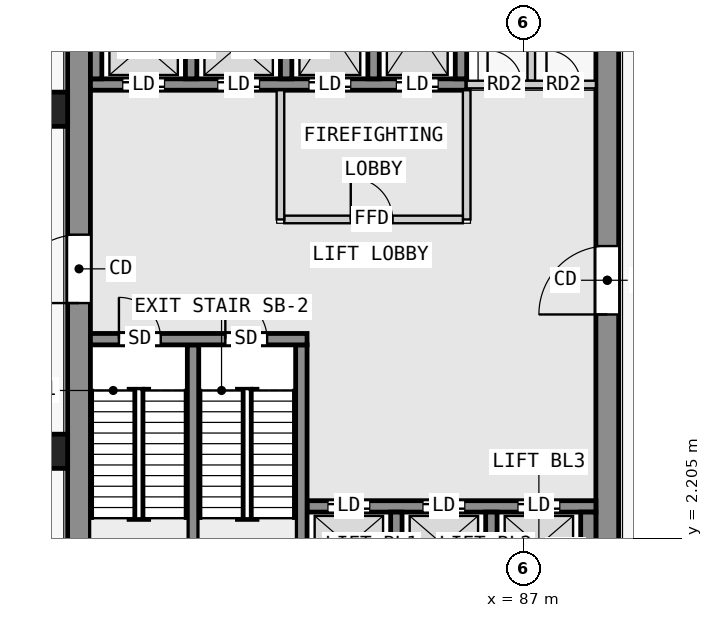
"""IFC4 building model, lengths in metres.
Left out: names, types, materials, properties, quantities, classifications, styles, units other than length and angle.
Written with IfcOpenShell. Run it as: python <this file> out.ifc"""

import sys

from ifc_helpers import new_model, si_unit, direction, frame, frame_2d, origin, origin_2d, place, context, subcontext, project, spatial, rectangle, extrude, element, fill, save


model = new_model("IFC4")
c1 = context("Model", 3, precision=1e-05, world=origin(), true_north=direction((0.0, 1.0)))
c2 = subcontext(c1, "Body", "Model", "MODEL_VIEW")
j1 = project(units=[si_unit("LENGTHUNIT", "METRE"), si_unit("PLANEANGLEUNIT", "RADIAN")], contexts=[c1])
p1 = place(None, origin())
s1 = spatial("IfcSite", under=j1, at=p1, CompositionType="ELEMENT")
p2 = place(p1, origin())
s2 = spatial("IfcBuilding", under=s1, at=p2, CompositionType="ELEMENT")
p3 = place(p2, frame((0.0, 0.0, 12.8)))
s3 = spatial("IfcBuildingStorey", under=s2, at=p3, CompositionType="ELEMENT", Elevation=12.8)
for number, where, z_axis, x_axis in (
    (1, (74.55, 13.5, 0.0), (0.0, 0.0, 1.0), (1.0, 0.0, 0.0)),
    (2, (74.55, 4.5, 0.0), (0.0, 0.0, 1.0), (1.0, 0.0, 0.0)),
):
    element("IfcColumn", number, at=place(p3, frame(where, z_axis=z_axis, x_axis=x_axis)), inside=s3, PredefinedType="COLUMN", context=c2, shape_type="SweptSolid", body=[
        extrude(rectangle(XDim=0.9, YDim=0.9, at=origin_2d()), origin(), (0.0, 0.0, 1.0), 4.5),
    ])
p4 = place(p3, frame((75.3, 0.6, 0.0), z_axis=(0.0, 0.0, 1.0), x_axis=(0.0, 1.0, 0.0)))
e3 = element("IfcWall", 3, at=p4, inside=s3, PredefinedType="SHEAR", context=c2, shape_type="SweptSolid", body=[
    extrude(rectangle(XDim=16.8, YDim=0.6, at=frame_2d((8.4, 0.0))), origin(), (0.0, 0.0, 1.0), 4.15),
])
p5 = place(p4, frame((7.8, 0.0, 0.0)))
e4 = element("IfcOpeningElement", 4, at=p5, cuts=e3, PredefinedType="OPENING", context=c2, shape_type="SweptSolid", body=[
    extrude(rectangle(XDim=1.8, YDim=2.1, at=frame_2d((0.9, 1.05))), frame((0.0, 0.31, 0.0), z_axis=(0.0, -1.0, 0.0), x_axis=(1.0, 0.0, 0.0)), (0.0, 0.0, 1.0), 0.62),
])
p6 = place(p3, frame((89.2, 0.6, 0.0), z_axis=(0.0, 0.0, 1.0), x_axis=(0.0, 1.0, 0.0)))
e5 = element("IfcWall", 5, at=p6, inside=s3, PredefinedType="SHEAR", context=c2, shape_type="SweptSolid", body=[
    extrude(rectangle(XDim=16.8, YDim=0.6, at=frame_2d((8.4, 0.0))), origin(), (0.0, 0.0, 1.0), 4.15),
])
p7 = place(p6, frame((7.5, 0.0, 0.0)))
e6 = element("IfcOpeningElement", 6, at=p7, cuts=e5, PredefinedType="OPENING", context=c2, shape_type="SweptSolid", body=[
    extrude(rectangle(XDim=1.8, YDim=2.1, at=frame_2d((0.9, 1.05))), frame((0.0, 0.31, 0.0), z_axis=(0.0, -1.0, 0.0), x_axis=(1.0, 0.0, 0.0)), (0.0, 0.0, 1.0), 0.62),
])
p8 = place(p3, frame((75.6, 7.45, 0.0), z_axis=(0.0, 0.0, 1.0), x_axis=(1.0, 0.0, 0.0)))
e7 = element("IfcWall", 7, at=p8, inside=s3, PredefinedType="SHEAR", context=c2, shape_type="SweptSolid", body=[
    extrude(rectangle(XDim=5.7, YDim=0.3, at=frame_2d((2.85, 0.0))), origin(), (0.0, 0.0, 1.0), 4.15),
])
p9 = place(p8, frame((0.75, 0.0, 0.0)))
e8 = element("IfcOpeningElement", 8, at=p9, cuts=e7, PredefinedType="OPENING", context=c2, shape_type="SweptSolid", body=[
    extrude(rectangle(XDim=1.1, YDim=2.1, at=frame_2d((0.55, 1.05))), frame((0.0, 0.16, 0.0), z_axis=(0.0, -1.0, 0.0), x_axis=(1.0, 0.0, 0.0)), (0.0, 0.0, 1.0), 0.32),
])
p10 = place(p8, frame((3.55, 0.0, 0.0)))
e9 = element("IfcOpeningElement", 9, at=p10, cuts=e7, PredefinedType="OPENING", context=c2, shape_type="SweptSolid", body=[
    extrude(rectangle(XDim=1.1, YDim=2.1, at=frame_2d((0.55, 1.05))), frame((0.0, 0.16, 0.0), z_axis=(0.0, -1.0, 0.0), x_axis=(1.0, 0.0, 0.0)), (0.0, 0.0, 1.0), 0.32),
])
for number, where, z_axis, x_axis in (
    (10, (78.3, 0.9, 0.0), (0.0, 0.0, 1.0), (0.0, 1.0, 0.0)),
    (11, (81.15, 0.9, 0.0), (0.0, 0.0, 1.0), (0.0, 1.0, 0.0)),
):
    element("IfcWall", number, at=place(p3, frame(where, z_axis=z_axis, x_axis=x_axis)), inside=s3, PredefinedType="SHEAR", context=c2, shape_type="SweptSolid", body=[
        extrude(rectangle(XDim=6.4, YDim=0.3, at=frame_2d((3.2, 0.0))), origin(), (0.0, 0.0, 1.0), 4.15),
    ])
for number, where, z_axis, x_axis in (
    (12, (83.65, 0.9, 0.0), (0.0, 0.0, 1.0), (0.0, 1.0, 0.0)),
    (13, (86.15, 0.9, 0.0), (0.0, 0.0, 1.0), (0.0, 1.0, 0.0)),
):
    element("IfcWall", number, at=place(p3, frame(where, z_axis=z_axis, x_axis=x_axis)), inside=s3, PredefinedType="SHEAR", context=c2, shape_type="SweptSolid", body=[
        extrude(rectangle(XDim=2.0, YDim=0.3, at=frame_2d((1.0, 0.0))), origin(), (0.0, 0.0, 1.0), 4.15),
    ])
p11 = place(p3, frame((88.7, 0.9, 0.0), z_axis=(0.0, 0.0, 1.0), x_axis=(0.0, 1.0, 0.0)))
e14 = element("IfcWall", 14, at=p11, inside=s3, PredefinedType="SHEAR", context=c2, shape_type="SweptSolid", body=[
    extrude(rectangle(XDim=2.0, YDim=0.4, at=frame_2d((1.0, 0.0))), origin(), (0.0, 0.0, 1.0), 4.15),
])
p12 = place(p3, frame((81.3, 3.05, 0.0), z_axis=(0.0, 0.0, 1.0), x_axis=(1.0, 0.0, 0.0)))
e15 = element("IfcWall", 15, at=p12, inside=s3, PredefinedType="SHEAR", context=c2, shape_type="SweptSolid", body=[
    extrude(rectangle(XDim=7.6, YDim=0.3, at=frame_2d((3.8, 0.0))), origin(), (0.0, 0.0, 1.0), 4.15),
])
p13 = place(p12, frame((0.55, 0.0, 0.0)))
e16 = element("IfcOpeningElement", 16, at=p13, cuts=e15, PredefinedType="OPENING", context=c2, shape_type="SweptSolid", body=[
    extrude(rectangle(XDim=1.1, YDim=2.1, at=frame_2d((0.55, 1.05))), frame((0.0, 0.16, 0.0), z_axis=(0.0, -1.0, 0.0), x_axis=(1.0, 0.0, 0.0)), (0.0, 0.0, 1.0), 0.32),
])
p14 = place(p12, frame((3.05, 0.0, 0.0)))
e17 = element("IfcOpeningElement", 17, at=p14, cuts=e15, PredefinedType="OPENING", context=c2, shape_type="SweptSolid", body=[
    extrude(rectangle(XDim=1.1, YDim=2.1, at=frame_2d((0.55, 1.05))), frame((0.0, 0.16, 0.0), z_axis=(0.0, -1.0, 0.0), x_axis=(1.0, 0.0, 0.0)), (0.0, 0.0, 1.0), 0.32),
])
p15 = place(p12, frame((5.55, 0.0, 0.0)))
e18 = element("IfcOpeningElement", 18, at=p15, cuts=e15, PredefinedType="OPENING", context=c2, shape_type="SweptSolid", body=[
    extrude(rectangle(XDim=1.1, YDim=2.1, at=frame_2d((0.55, 1.05))), frame((0.0, 0.16, 0.0), z_axis=(0.0, -1.0, 0.0), x_axis=(1.0, 0.0, 0.0)), (0.0, 0.0, 1.0), 0.32),
])
p16 = place(p3, frame((75.6, 14.15, 0.0), z_axis=(0.0, 0.0, 1.0), x_axis=(1.0, 0.0, 0.0)))
e19 = element("IfcWall", 19, at=p16, inside=s3, PredefinedType="SHEAR", context=c2, shape_type="SweptSolid", body=[
    extrude(rectangle(XDim=9.9, YDim=0.3, at=frame_2d((4.95, 0.0))), origin(), (0.0, 0.0, 1.0), 4.15),
])
p17 = place(p16, frame((0.85, 0.0, 0.0)))
e20 = element("IfcOpeningElement", 20, at=p17, cuts=e19, PredefinedType="OPENING", context=c2, shape_type="SweptSolid", body=[
    extrude(rectangle(XDim=1.1, YDim=2.1, at=frame_2d((0.55, 1.05))), frame((0.0, 0.16, 0.0), z_axis=(0.0, -1.0, 0.0), x_axis=(1.0, 0.0, 0.0)), (0.0, 0.0, 1.0), 0.32),
])
p18 = place(p16, frame((3.35, 0.0, 0.0)))
e21 = element("IfcOpeningElement", 21, at=p18, cuts=e19, PredefinedType="OPENING", context=c2, shape_type="SweptSolid", body=[
    extrude(rectangle(XDim=1.1, YDim=2.1, at=frame_2d((0.55, 1.05))), frame((0.0, 0.16, 0.0), z_axis=(0.0, -1.0, 0.0), x_axis=(1.0, 0.0, 0.0)), (0.0, 0.0, 1.0), 0.32),
])
p19 = place(p16, frame((5.75, 0.0, 0.0)))
e22 = element("IfcOpeningElement", 22, at=p19, cuts=e19, PredefinedType="OPENING", context=c2, shape_type="SweptSolid", body=[
    extrude(rectangle(XDim=1.1, YDim=2.1, at=frame_2d((0.55, 1.05))), frame((0.0, 0.16, 0.0), z_axis=(0.0, -1.0, 0.0), x_axis=(1.0, 0.0, 0.0)), (0.0, 0.0, 1.0), 0.32),
])
p20 = place(p16, frame((8.05, 0.0, 0.0)))
e23 = element("IfcOpeningElement", 23, at=p20, cuts=e19, PredefinedType="OPENING", context=c2, shape_type="SweptSolid", body=[
    extrude(rectangle(XDim=1.1, YDim=2.1, at=frame_2d((0.55, 1.05))), frame((0.0, 0.16, 0.0), z_axis=(0.0, -1.0, 0.0), x_axis=(1.0, 0.0, 0.0)), (0.0, 0.0, 1.0), 0.32),
])
for number, where, z_axis, x_axis in (
    (24, (75.75, 14.3, 0.0), (0.0, 0.0, 1.0), (0.0, 1.0, 0.0)),
    (25, (78.25, 14.3, 0.0), (0.0, 0.0, 1.0), (0.0, 1.0, 0.0)),
    (26, (80.75, 14.3, 0.0), (0.0, 0.0, 1.0), (0.0, 1.0, 0.0)),
    (27, (83.05, 14.3, 0.0), (0.0, 0.0, 1.0), (0.0, 1.0, 0.0)),
    (28, (85.35, 14.3, 0.0), (0.0, 0.0, 1.0), (0.0, 1.0, 0.0)),
):
    element("IfcWall", number, at=place(p3, frame(where, z_axis=z_axis, x_axis=x_axis)), inside=s3, PredefinedType="SHEAR", context=c2, shape_type="SweptSolid", body=[
        extrude(rectangle(XDim=2.8, YDim=0.3, at=frame_2d((1.4, 0.0))), origin(), (0.0, 0.0, 1.0), 4.15),
    ])
p21 = place(p3, frame((80.6, 10.6, 0.0), z_axis=(0.0, 0.0, 1.0), x_axis=(0.0, 1.0, 0.0)))
e29 = element("IfcWall", 29, at=p21, inside=s3, PredefinedType="PARTITIONING", context=c2, shape_type="SweptSolid", body=[
    extrude(rectangle(XDim=3.4, YDim=0.2, at=frame_2d((1.7, 0.0))), origin(), (0.0, 0.0, 1.0), 4.15),
])
p22 = place(p3, frame((80.7, 10.6, 0.0), z_axis=(0.0, 0.0, 1.0), x_axis=(1.0, 0.0, 0.0)))
e30 = element("IfcWall", 30, at=p22, inside=s3, PredefinedType="PARTITIONING", context=c2, shape_type="SweptSolid", body=[
    extrude(rectangle(XDim=4.7, YDim=0.2, at=frame_2d((2.35, 0.0))), origin(), (0.0, 0.0, 1.0), 4.15),
])
p23 = place(p22, frame((1.75, 0.0, 0.0)))
e31 = element("IfcOpeningElement", 31, at=p23, cuts=e30, PredefinedType="OPENING", context=c2, shape_type="SweptSolid", body=[
    extrude(rectangle(XDim=1.1, YDim=2.1, at=frame_2d((0.55, 1.05))), frame((0.0, 0.11, 0.0), z_axis=(0.0, -1.0, 0.0), x_axis=(1.0, 0.0, 0.0)), (0.0, 0.0, 1.0), 0.22),
])
p24 = place(p3, frame((85.5, 10.6, 0.0), z_axis=(0.0, 0.0, 1.0), x_axis=(0.0, 1.0, 0.0)))
e32 = element("IfcWall", 32, at=p24, inside=s3, PredefinedType="PARTITIONING", context=c2, shape_type="SweptSolid", body=[
    extrude(rectangle(XDim=3.4, YDim=0.2, at=frame_2d((1.7, 0.0))), origin(), (0.0, 0.0, 1.0), 4.15),
])
p25 = place(p3, frame((85.5, 14.15, 0.0), z_axis=(0.0, 0.0, 1.0), x_axis=(1.0, 0.0, 0.0)))
e33 = element("IfcWall", 33, at=p25, inside=s3, PredefinedType="PARTITIONING", context=c2, shape_type="SweptSolid", body=[
    extrude(rectangle(XDim=3.4, YDim=0.2, at=frame_2d((1.7, 0.0))), origin(), (0.0, 0.0, 1.0), 4.15),
])
p26 = place(p25, frame((0.55, 0.0, 0.0)))
e34 = element("IfcOpeningElement", 34, at=p26, cuts=e33, PredefinedType="OPENING", context=c2, shape_type="SweptSolid", body=[
    extrude(rectangle(XDim=0.9, YDim=2.1, at=frame_2d((0.45, 1.05))), frame((0.0, 0.11, 0.0), z_axis=(0.0, -1.0, 0.0), x_axis=(1.0, 0.0, 0.0)), (0.0, 0.0, 1.0), 0.22),
])
p27 = place(p25, frame((2.1, 0.0, 0.0)))
e35 = element("IfcOpeningElement", 35, at=p27, cuts=e33, PredefinedType="OPENING", context=c2, shape_type="SweptSolid", body=[
    extrude(rectangle(XDim=0.9, YDim=2.1, at=frame_2d((0.45, 1.05))), frame((0.0, 0.11, 0.0), z_axis=(0.0, -1.0, 0.0), x_axis=(1.0, 0.0, 0.0)), (0.0, 0.0, 1.0), 0.22),
])
p28 = place(p3, frame((87.2, 14.25, 0.0), z_axis=(0.0, 0.0, 1.0), x_axis=(0.0, 1.0, 0.0)))
e36 = element("IfcWall", 36, at=p28, inside=s3, PredefinedType="PARTITIONING", context=c2, shape_type="SweptSolid", body=[
    extrude(rectangle(XDim=3.15, YDim=0.2, at=frame_2d((1.575, 0.0))), origin(), (0.0, 0.0, 1.0), 4.15),
])
p29 = place(p23, origin())
e37 = element("IfcDoor", 37, at=p29, inside=s3, OperationType="SINGLE_SWING_LEFT", PredefinedType="DOOR", context=c2, shape_type="SweptSolid", body=[
    extrude(rectangle(XDim=1.1, YDim=2.1, at=frame_2d((0.55, 1.05))), frame((0.0, 0.025, 0.0), z_axis=(0.0, -1.0, 0.0), x_axis=(1.0, 0.0, 0.0)), (0.0, 0.0, 1.0), 0.05),
])
fill(e31, e37)
p30 = place(p13, origin())
e38 = element("IfcDoor", 38, at=p30, inside=s3, OperationType="DOUBLE_DOOR_SLIDING", PredefinedType="DOOR", context=c2, shape_type="SweptSolid", body=[
    extrude(rectangle(XDim=1.1, YDim=2.1, at=frame_2d((0.55, 1.05))), frame((0.0, 0.025, 0.0), z_axis=(0.0, -1.0, 0.0), x_axis=(1.0, 0.0, 0.0)), (0.0, 0.0, 1.0), 0.05),
])
fill(e16, e38)
p31 = place(p14, origin())
e39 = element("IfcDoor", 39, at=p31, inside=s3, OperationType="DOUBLE_DOOR_SLIDING", PredefinedType="DOOR", context=c2, shape_type="SweptSolid", body=[
    extrude(rectangle(XDim=1.1, YDim=2.1, at=frame_2d((0.55, 1.05))), frame((0.0, 0.025, 0.0), z_axis=(0.0, -1.0, 0.0), x_axis=(1.0, 0.0, 0.0)), (0.0, 0.0, 1.0), 0.05),
])
fill(e17, e39)
p32 = place(p15, origin())
e40 = element("IfcDoor", 40, at=p32, inside=s3, OperationType="DOUBLE_DOOR_SLIDING", PredefinedType="DOOR", context=c2, shape_type="SweptSolid", body=[
    extrude(rectangle(XDim=1.1, YDim=2.1, at=frame_2d((0.55, 1.05))), frame((0.0, 0.025, 0.0), z_axis=(0.0, -1.0, 0.0), x_axis=(1.0, 0.0, 0.0)), (0.0, 0.0, 1.0), 0.05),
])
fill(e18, e40)
p33 = place(p17, origin())
e41 = element("IfcDoor", 41, at=p33, inside=s3, OperationType="DOUBLE_DOOR_SLIDING", PredefinedType="DOOR", context=c2, shape_type="SweptSolid", body=[
    extrude(rectangle(XDim=1.1, YDim=2.1, at=frame_2d((0.55, 1.05))), frame((0.0, 0.025, 0.0), z_axis=(0.0, -1.0, 0.0), x_axis=(1.0, 0.0, 0.0)), (0.0, 0.0, 1.0), 0.05),
])
fill(e20, e41)
p34 = place(p18, origin())
e42 = element("IfcDoor", 42, at=p34, inside=s3, OperationType="DOUBLE_DOOR_SLIDING", PredefinedType="DOOR", context=c2, shape_type="SweptSolid", body=[
    extrude(rectangle(XDim=1.1, YDim=2.1, at=frame_2d((0.55, 1.05))), frame((0.0, 0.025, 0.0), z_axis=(0.0, -1.0, 0.0), x_axis=(1.0, 0.0, 0.0)), (0.0, 0.0, 1.0), 0.05),
])
fill(e21, e42)
p35 = place(p19, origin())
e43 = element("IfcDoor", 43, at=p35, inside=s3, OperationType="DOUBLE_DOOR_SLIDING", PredefinedType="DOOR", context=c2, shape_type="SweptSolid", body=[
    extrude(rectangle(XDim=1.1, YDim=2.1, at=frame_2d((0.55, 1.05))), frame((0.0, 0.025, 0.0), z_axis=(0.0, -1.0, 0.0), x_axis=(1.0, 0.0, 0.0)), (0.0, 0.0, 1.0), 0.05),
])
fill(e22, e43)
p36 = place(p20, origin())
e44 = element("IfcDoor", 44, at=p36, inside=s3, OperationType="DOUBLE_DOOR_SLIDING", PredefinedType="DOOR", context=c2, shape_type="SweptSolid", body=[
    extrude(rectangle(XDim=1.1, YDim=2.1, at=frame_2d((0.55, 1.05))), frame((0.0, 0.025, 0.0), z_axis=(0.0, -1.0, 0.0), x_axis=(1.0, 0.0, 0.0)), (0.0, 0.0, 1.0), 0.05),
])
fill(e23, e44)
p37 = place(p9, origin())
e45 = element("IfcDoor", 45, at=p37, inside=s3, OperationType="SINGLE_SWING_RIGHT", PredefinedType="DOOR", context=c2, shape_type="SweptSolid", body=[
    extrude(rectangle(XDim=1.1, YDim=2.1, at=frame_2d((0.55, 1.05))), frame((0.0, 0.025, 0.0), z_axis=(0.0, -1.0, 0.0), x_axis=(1.0, 0.0, 0.0)), (0.0, 0.0, 1.0), 0.05),
])
fill(e8, e45)
p38 = place(p10, origin())
e46 = element("IfcDoor", 46, at=p38, inside=s3, OperationType="SINGLE_SWING_LEFT", PredefinedType="DOOR", context=c2, shape_type="SweptSolid", body=[
    extrude(rectangle(XDim=1.1, YDim=2.1, at=frame_2d((0.55, 1.05))), frame((0.0, 0.025, 0.0), z_axis=(0.0, -1.0, 0.0), x_axis=(1.0, 0.0, 0.0)), (0.0, 0.0, 1.0), 0.05),
])
fill(e9, e46)
p39 = place(p5, origin())
e47 = element("IfcDoor", 47, at=p39, inside=s3, OperationType="DOUBLE_DOOR_SINGLE_SWING", PredefinedType="DOOR", context=c2, shape_type="SweptSolid", body=[
    extrude(rectangle(XDim=1.8, YDim=2.1, at=frame_2d((0.9, 1.05))), frame((0.0, 0.025, 0.0), z_axis=(0.0, -1.0, 0.0), x_axis=(1.0, 0.0, 0.0)), (0.0, 0.0, 1.0), 0.05),
])
fill(e4, e47)
p40 = place(p7, origin())
e48 = element("IfcDoor", 48, at=p40, inside=s3, OperationType="DOUBLE_DOOR_SINGLE_SWING", PredefinedType="DOOR", context=c2, shape_type="SweptSolid", body=[
    extrude(rectangle(XDim=1.8, YDim=2.1, at=frame_2d((0.9, 1.05))), frame((0.0, 0.025, 0.0), z_axis=(0.0, -1.0, 0.0), x_axis=(1.0, 0.0, 0.0)), (0.0, 0.0, 1.0), 0.05),
])
fill(e6, e48)
p41 = place(p26, origin())
e49 = element("IfcDoor", 49, at=p41, inside=s3, OperationType="SINGLE_SWING_LEFT", PredefinedType="DOOR", context=c2, shape_type="SweptSolid", body=[
    extrude(rectangle(XDim=0.9, YDim=2.1, at=frame_2d((0.45, 1.05))), frame((0.0, 0.025, 0.0), z_axis=(0.0, -1.0, 0.0), x_axis=(1.0, 0.0, 0.0)), (0.0, 0.0, 1.0), 0.05),
])
fill(e34, e49)
p42 = place(p27, origin())
e50 = element("IfcDoor", 50, at=p42, inside=s3, OperationType="SINGLE_SWING_LEFT", PredefinedType="DOOR", context=c2, shape_type="SweptSolid", body=[
    extrude(rectangle(XDim=0.9, YDim=2.1, at=frame_2d((0.45, 1.05))), frame((0.0, 0.025, 0.0), z_axis=(0.0, -1.0, 0.0), x_axis=(1.0, 0.0, 0.0)), (0.0, 0.0, 1.0), 0.05),
])
fill(e35, e50)
save(model, sys.argv[1])
